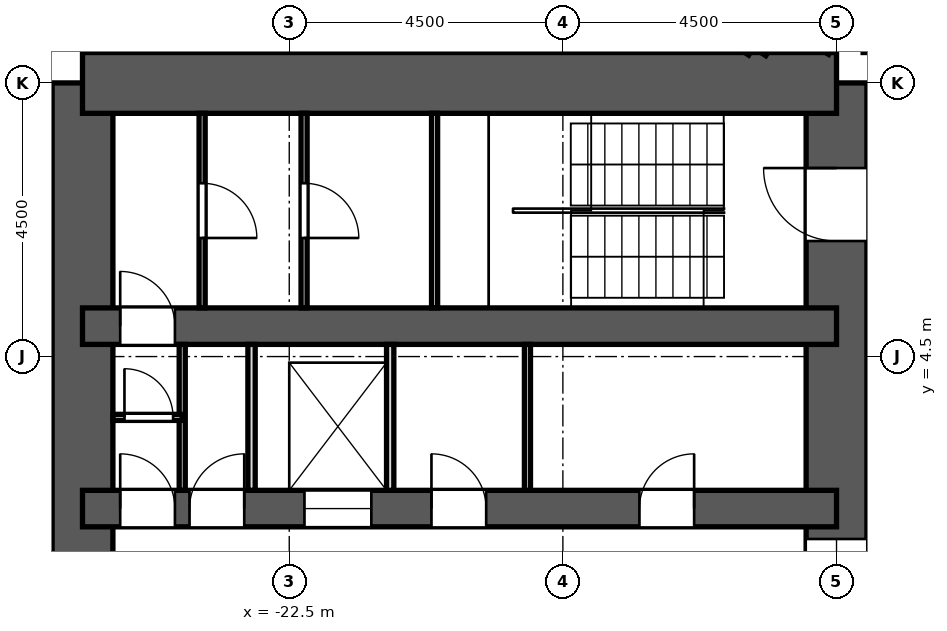
"""IFC4 building model, lengths in metres.
Left out: names, types, materials, properties, quantities, classifications, styles, units other than length and angle.
Written with IfcOpenShell. Run it as: python <this file> out.ifc"""

import sys

from ifc_helpers import new_model, si_unit, direction, frame, frame_2d, origin, place, context, subcontext, project, spatial, rectangle, extrude, element, fill, save


model = new_model("IFC4")
c1 = context("Model", 3, precision=1e-05, world=origin(), true_north=direction((0.0, 1.0)))
c2 = subcontext(c1, "Body", "Model", "MODEL_VIEW")
j1 = project(units=[si_unit("LENGTHUNIT", "METRE"), si_unit("PLANEANGLEUNIT", "RADIAN")], contexts=[c1])
p1 = place(None, origin())
s1 = spatial("IfcSite", under=j1, at=p1, CompositionType="ELEMENT")
p2 = place(p1, origin())
s2 = spatial("IfcBuilding", under=s1, at=p2, CompositionType="ELEMENT")
p3 = place(p2, frame((0.0, 0.0, 26.3)))
s3 = spatial("IfcBuildingStorey", under=s2, at=p3, CompositionType="ELEMENT", Elevation=26.3)
p4 = place(p3, frame((-13.5, -9.0, 0.0), z_axis=(0.0, 0.0, 1.0), x_axis=(0.0, 1.0, 0.0)))
e1 = element("IfcWall", 1, at=p4, inside=s3, PredefinedType="SHEAR", context=c2, shape_type="SweptSolid", body=[
    extrude(rectangle(XDim=18.0, YDim=1.0, at=frame_2d((9.0, 0.0))), origin(), (0.0, 0.0, 1.0), 3.3),
])
p5 = place(p4, frame((15.4, 0.0, 0.0)))
e2 = element("IfcOpeningElement", 2, at=p5, cuts=e1, PredefinedType="OPENING", context=c2, shape_type="SweptSolid", body=[
    extrude(rectangle(XDim=1.2, YDim=2.1, at=frame_2d((0.6, 1.05))), frame((0.0, 0.512, 0.0), z_axis=(0.0, -1.0, 0.0), x_axis=(1.0, 0.0, 0.0)), (0.0, 0.0, 1.0), 1.024),
])
p6 = place(p4, frame((1.4, 0.0, 0.0)))
e3 = element("IfcOpeningElement", 3, at=p6, cuts=e1, PredefinedType="OPENING", context=c2, shape_type="SweptSolid", body=[
    extrude(rectangle(XDim=1.2, YDim=2.1, at=frame_2d((0.6, 1.05))), frame((0.0, 0.512, 0.0), z_axis=(0.0, -1.0, 0.0), x_axis=(1.0, 0.0, 0.0)), (0.0, 0.0, 1.0), 1.024),
])
p7 = place(p4, frame((7.5, 0.0, 0.0)))
e4 = element("IfcOpeningElement", 4, at=p7, cuts=e1, PredefinedType="OPENING", context=c2, shape_type="SweptSolid", body=[
    extrude(rectangle(XDim=3.0, YDim=2.4, at=frame_2d((1.5, 1.2))), frame((0.0, 0.512, 0.0), z_axis=(0.0, -1.0, 0.0), x_axis=(1.0, 0.0, 0.0)), (0.0, 0.0, 1.0), 1.024),
])
p8 = place(p3, frame((-25.9, -9.0, 0.0), z_axis=(0.0, 0.0, 1.0), x_axis=(0.0, 1.0, 0.0)))
e5 = element("IfcWall", 5, at=p8, inside=s3, PredefinedType="SHEAR", context=c2, shape_type="SweptSolid", body=[
    extrude(rectangle(XDim=18.0, YDim=1.0, at=frame_2d((9.0, 0.0))), origin(), (0.0, 0.0, 1.0), 3.3),
])
p9 = place(p3, frame((-13.5, 9.0, 0.0), z_axis=(0.0, 0.0, 1.0), x_axis=(-1.0, 0.0, 0.0)))
e6 = element("IfcWall", 6, at=p9, inside=s3, PredefinedType="SHEAR", context=c2, shape_type="SweptSolid", body=[
    extrude(rectangle(XDim=12.4, YDim=1.0, at=frame_2d((6.2, 0.0))), origin(), (0.0, 0.0, 1.0), 3.3),
])
p10 = place(p3, frame((-13.5, 5.0, 0.0), z_axis=(0.0, 0.0, 1.0), x_axis=(-1.0, 0.0, 0.0)))
e7 = element("IfcWall", 7, at=p10, inside=s3, PredefinedType="SHEAR", context=c2, shape_type="SweptSolid", body=[
    extrude(rectangle(XDim=12.4, YDim=0.6, at=frame_2d((6.2, 0.0))), origin(), (0.0, 0.0, 1.0), 3.3),
])
p11 = place(p10, frame((10.88, 0.0, 0.0)))
e8 = element("IfcOpeningElement", 8, at=p11, cuts=e7, PredefinedType="OPENING", context=c2, shape_type="SweptSolid", body=[
    extrude(rectangle(XDim=0.9, YDim=2.1, at=frame_2d((0.45, 1.05))), frame((0.0, 0.312, 0.0), z_axis=(0.0, -1.0, 0.0), x_axis=(1.0, 0.0, 0.0)), (0.0, 0.0, 1.0), 0.624),
])
p12 = place(p3, frame((-13.5, 2.0, 0.0), z_axis=(0.0, 0.0, 1.0), x_axis=(-1.0, 0.0, 0.0)))
e9 = element("IfcWall", 9, at=p12, inside=s3, PredefinedType="SHEAR", context=c2, shape_type="SweptSolid", body=[
    extrude(rectangle(XDim=12.4, YDim=0.6, at=frame_2d((6.2, 0.0))), origin(), (0.0, 0.0, 1.0), 3.3),
])
p13 = place(p12, frame((7.65, 0.0, 0.0)))
e10 = element("IfcOpeningElement", 10, at=p13, cuts=e9, PredefinedType="OPENING", context=c2, shape_type="SweptSolid", body=[
    extrude(rectangle(XDim=1.1, YDim=2.1, at=frame_2d((0.55, 1.05))), frame((0.0, 0.312, 0.0), z_axis=(0.0, -1.0, 0.0), x_axis=(1.0, 0.0, 0.0)), (0.0, 0.0, 1.0), 0.624),
])
p14 = place(p12, frame((2.341, 0.0, 0.0)))
e11 = element("IfcOpeningElement", 11, at=p14, cuts=e9, PredefinedType="OPENING", context=c2, shape_type="SweptSolid", body=[
    extrude(rectangle(XDim=0.9, YDim=2.1, at=frame_2d((0.45, 1.05))), frame((0.0, 0.312, 0.0), z_axis=(0.0, -1.0, 0.0), x_axis=(1.0, 0.0, 0.0)), (0.0, 0.0, 1.0), 0.624),
])
p15 = place(p12, frame((5.761, 0.0, 0.0)))
e12 = element("IfcOpeningElement", 12, at=p15, cuts=e9, PredefinedType="OPENING", context=c2, shape_type="SweptSolid", body=[
    extrude(rectangle(XDim=0.9, YDim=2.1, at=frame_2d((0.45, 1.05))), frame((0.0, 0.312, 0.0), z_axis=(0.0, -1.0, 0.0), x_axis=(1.0, 0.0, 0.0)), (0.0, 0.0, 1.0), 0.624),
])
p16 = place(p12, frame((9.74, 0.0, 0.0)))
e13 = element("IfcOpeningElement", 13, at=p16, cuts=e9, PredefinedType="OPENING", context=c2, shape_type="SweptSolid", body=[
    extrude(rectangle(XDim=0.9, YDim=2.1, at=frame_2d((0.45, 1.05))), frame((0.0, 0.312, 0.0), z_axis=(0.0, -1.0, 0.0), x_axis=(1.0, 0.0, 0.0)), (0.0, 0.0, 1.0), 0.624),
])
p17 = place(p12, frame((10.88, 0.0, 0.0)))
e14 = element("IfcOpeningElement", 14, at=p17, cuts=e9, PredefinedType="OPENING", context=c2, shape_type="SweptSolid", body=[
    extrude(rectangle(XDim=0.9, YDim=2.1, at=frame_2d((0.45, 1.05))), frame((0.0, 0.312, 0.0), z_axis=(0.0, -1.0, 0.0), x_axis=(1.0, 0.0, 0.0)), (0.0, 0.0, 1.0), 0.624),
])
p18 = place(p3, frame((-26.208, 11.585, 0.0), z_axis=(0.0, 0.0, 1.0), x_axis=(-0.342028474173, -0.939689588564, 0.0)))
e15 = element("IfcWall", 15, at=p18, inside=s3, PredefinedType="SOLIDWALL", context=c2, shape_type="SweptSolid", body=[
    extrude(rectangle(XDim=3.846, YDim=0.6, at=frame_2d((1.923, 0.0))), origin(), (0.0, 0.0, 1.0), 2.75),
])
p19 = place(p3, frame((-15.957, 10.362, 0.0), z_axis=(0.0, 0.0, 1.0), x_axis=(0.838795721465, -0.544446267002, 0.0)))
e16 = element("IfcWall", 16, at=p19, inside=s3, PredefinedType="PARTITIONING", context=c2, shape_type="SweptSolid", body=[
    extrude(rectangle(XDim=1.583, YDim=0.125, at=frame_2d((0.792, 0.0))), origin(), (0.0, 0.0, 1.0), 2.75),
])
p20 = place(p3, frame((-19.325, 12.307, 0.0), z_axis=(0.0, 0.0, 1.0), x_axis=(0.843449781198, -0.537208029163, 0.0)))
e17 = element("IfcWall", 17, at=p20, inside=s3, PredefinedType="PARTITIONING", context=c2, shape_type="SweptSolid", body=[
    extrude(rectangle(XDim=5.225, YDim=0.1, at=frame_2d((2.612, 0.0))), origin(), (0.0, 0.0, 1.0), 2.75),
])
p21 = place(p20, frame((2.163, 0.0, 0.0)))
e18 = element("IfcOpeningElement", 18, at=p21, cuts=e17, PredefinedType="OPENING", context=c2, shape_type="SweptSolid", body=[
    extrude(rectangle(XDim=0.9, YDim=2.1, at=frame_2d((0.45, 1.05))), frame((0.0, 0.062, 0.0), z_axis=(0.0, -1.0, 0.0), x_axis=(1.0, 0.0, 0.0)), (0.0, 0.0, 1.0), 0.124),
])
p22 = place(p3, frame((-13.683, 9.5, 0.0), z_axis=(0.0, 0.0, 1.0), x_axis=(0.500018234033, 0.866014876105, 0.0)))
e19 = element("IfcWall", 19, at=p22, inside=s3, PredefinedType="PARTITIONING", context=c2, shape_type="SweptSolid", body=[
    extrude(rectangle(XDim=1.286, YDim=0.125, at=frame_2d((0.643, 0.0))), origin(), (0.0, 0.0, 1.0), 2.75),
])
p23 = place(p3, frame((-18.583, 2.3, 0.0), z_axis=(0.0, 0.0, 1.0), x_axis=(0.0, 1.0, 0.0)))
e20 = element("IfcWall", 20, at=p23, inside=s3, PredefinedType="PARTITIONING", context=c2, shape_type="SweptSolid", body=[
    extrude(rectangle(XDim=2.4, YDim=0.1, at=frame_2d((1.2, 0.0))), origin(), (0.0, 0.0, 1.0), 2.75),
])
for number, where, z_axis, x_axis in (
    (21, (-20.84, 2.3, 0.0), (0.0, 0.0, 1.0), (0.0, 1.0, 0.0)),
    (22, (-23.12, 2.3, 0.0), (0.0, 0.0, 1.0), (0.0, 1.0, 0.0)),
):
    element("IfcWall", number, at=place(p3, frame(where, z_axis=z_axis, x_axis=x_axis)), inside=s3, PredefinedType="PARTITIONING", context=c2, shape_type="SweptSolid", body=[
        extrude(rectangle(XDim=2.4, YDim=0.12, at=frame_2d((1.2, 0.0))), origin(), (0.0, 0.0, 1.0), 2.75),
    ])
p24 = place(p3, frame((-24.26, 2.3, 0.0), z_axis=(0.0, 0.0, 1.0), x_axis=(0.0, 1.0, 0.0)))
e23 = element("IfcWall", 23, at=p24, inside=s3, PredefinedType="PARTITIONING", context=c2, shape_type="SweptSolid", body=[
    extrude(rectangle(XDim=2.4, YDim=0.1, at=frame_2d((1.2, 0.0))), origin(), (0.0, 0.0, 1.0), 2.75),
])
p25 = place(p3, frame((-24.26, 3.5, 0.0), z_axis=(0.0, 0.0, 1.0), x_axis=(-1.0, 0.0, 0.0)))
e24 = element("IfcWall", 24, at=p25, inside=s3, PredefinedType="PARTITIONING", context=c2, shape_type="SweptSolid", body=[
    extrude(rectangle(XDim=1.14, YDim=0.1, at=frame_2d((0.57, 0.0))), origin(), (0.0, 0.0, 1.0), 2.75),
])
p26 = place(p25, frame((0.15, 0.0, 0.0)))
e25 = element("IfcOpeningElement", 25, at=p26, cuts=e24, PredefinedType="OPENING", context=c2, shape_type="SweptSolid", body=[
    extrude(rectangle(XDim=0.8, YDim=2.1, at=frame_2d((0.4, 1.05))), frame((0.0, 0.062, 0.0), z_axis=(0.0, -1.0, 0.0), x_axis=(1.0, 0.0, 0.0)), (0.0, 0.0, 1.0), 0.124),
])
p27 = place(p3, frame((-20.11, 5.3, 0.0), z_axis=(0.0, 0.0, 1.0), x_axis=(0.0, 1.0, 0.0)))
e26 = element("IfcWall", 26, at=p27, inside=s3, PredefinedType="PARTITIONING", context=c2, shape_type="SweptSolid", body=[
    extrude(rectangle(XDim=3.2, YDim=0.1, at=frame_2d((1.6, 0.0))), origin(), (0.0, 0.0, 1.0), 2.75),
])
p28 = place(p3, frame((-22.256, 5.3, 0.0), z_axis=(0.0, 0.0, 1.0), x_axis=(0.0, 1.0, 0.0)))
e27 = element("IfcWall", 27, at=p28, inside=s3, PredefinedType="PARTITIONING", context=c2, shape_type="SweptSolid", body=[
    extrude(rectangle(XDim=3.2, YDim=0.1, at=frame_2d((1.6, 0.0))), origin(), (0.0, 0.0, 1.0), 2.75),
])
p29 = place(p28, frame((1.15, 0.0, 0.0)))
e28 = element("IfcOpeningElement", 28, at=p29, cuts=e27, PredefinedType="OPENING", context=c2, shape_type="SweptSolid", body=[
    extrude(rectangle(XDim=0.9, YDim=2.1, at=frame_2d((0.45, 1.05))), frame((0.0, 0.062, 0.0), z_axis=(0.0, -1.0, 0.0), x_axis=(1.0, 0.0, 0.0)), (0.0, 0.0, 1.0), 0.124),
])
p30 = place(p3, frame((-23.933, 5.3, 0.0), z_axis=(0.0, 0.0, 1.0), x_axis=(0.0, 1.0, 0.0)))
e29 = element("IfcWall", 29, at=p30, inside=s3, PredefinedType="PARTITIONING", context=c2, shape_type="SweptSolid", body=[
    extrude(rectangle(XDim=3.2, YDim=0.1, at=frame_2d((1.6, 0.0))), origin(), (0.0, 0.0, 1.0), 2.75),
])
p31 = place(p30, frame((1.15, 0.0, 0.0)))
e30 = element("IfcOpeningElement", 30, at=p31, cuts=e29, PredefinedType="OPENING", context=c2, shape_type="SweptSolid", body=[
    extrude(rectangle(XDim=0.9, YDim=2.1, at=frame_2d((0.45, 1.05))), frame((0.0, 0.062, 0.0), z_axis=(0.0, -1.0, 0.0), x_axis=(1.0, 0.0, 0.0)), (0.0, 0.0, 1.0), 0.124),
])
p32 = place(p13, origin())
e31 = element("IfcDoor", 31, at=p32, inside=s3, OperationType="DOUBLE_DOOR_SLIDING", PredefinedType="DOOR", context=c2, shape_type="SweptSolid", body=[
    extrude(rectangle(XDim=1.1, YDim=2.1, at=frame_2d((0.55, 1.05))), frame((0.0, 0.025, 0.0), z_axis=(0.0, -1.0, 0.0), x_axis=(1.0, 0.0, 0.0)), (0.0, 0.0, 1.0), 0.05),
])
fill(e10, e31)
p33 = place(p14, frame((0.9, 0.0, 0.0), z_axis=(0.0, 0.0, 1.0), x_axis=(-1.0, 0.0, 0.0)))
e32 = element("IfcDoor", 32, at=p33, inside=s3, OperationType="SINGLE_SWING_RIGHT", PredefinedType="DOOR", context=c2, shape_type="SweptSolid", body=[
    extrude(rectangle(XDim=0.9, YDim=2.1, at=frame_2d((0.45, 1.05))), frame((0.0, 0.025, 0.0), z_axis=(0.0, -1.0, 0.0), x_axis=(1.0, 0.0, 0.0)), (0.0, 0.0, 1.0), 0.05),
])
fill(e11, e32)
p34 = place(p15, frame((0.9, 0.0, 0.0), z_axis=(0.0, 0.0, 1.0), x_axis=(-1.0, 0.0, 0.0)))
e33 = element("IfcDoor", 33, at=p34, inside=s3, OperationType="SINGLE_SWING_LEFT", PredefinedType="DOOR", context=c2, shape_type="SweptSolid", body=[
    extrude(rectangle(XDim=0.9, YDim=2.1, at=frame_2d((0.45, 1.05))), frame((0.0, 0.025, 0.0), z_axis=(0.0, -1.0, 0.0), x_axis=(1.0, 0.0, 0.0)), (0.0, 0.0, 1.0), 0.05),
])
fill(e12, e33)
p35 = place(p16, frame((0.9, 0.0, 0.0), z_axis=(0.0, 0.0, 1.0), x_axis=(-1.0, 0.0, 0.0)))
e34 = element("IfcDoor", 34, at=p35, inside=s3, OperationType="SINGLE_SWING_RIGHT", PredefinedType="DOOR", context=c2, shape_type="SweptSolid", body=[
    extrude(rectangle(XDim=0.9, YDim=2.1, at=frame_2d((0.45, 1.05))), frame((0.0, 0.025, 0.0), z_axis=(0.0, -1.0, 0.0), x_axis=(1.0, 0.0, 0.0)), (0.0, 0.0, 1.0), 0.05),
])
fill(e13, e34)
p36 = place(p17, frame((0.9, 0.0, 0.0), z_axis=(0.0, 0.0, 1.0), x_axis=(-1.0, 0.0, 0.0)))
e35 = element("IfcDoor", 35, at=p36, inside=s3, OperationType="SINGLE_SWING_LEFT", PredefinedType="DOOR", context=c2, shape_type="SweptSolid", body=[
    extrude(rectangle(XDim=0.9, YDim=2.1, at=frame_2d((0.45, 1.05))), frame((0.0, 0.025, 0.0), z_axis=(0.0, -1.0, 0.0), x_axis=(1.0, 0.0, 0.0)), (0.0, 0.0, 1.0), 0.05),
])
fill(e14, e35)
p37 = place(p26, frame((0.8, 0.0, 0.0), z_axis=(0.0, 0.0, 1.0), x_axis=(-1.0, 0.0, 0.0)))
e36 = element("IfcDoor", 36, at=p37, inside=s3, OperationType="SINGLE_SWING_LEFT", PredefinedType="DOOR", context=c2, shape_type="SweptSolid", body=[
    extrude(rectangle(XDim=0.8, YDim=2.1, at=frame_2d((0.4, 1.05))), frame((0.0, 0.025, 0.0), z_axis=(0.0, -1.0, 0.0), x_axis=(1.0, 0.0, 0.0)), (0.0, 0.0, 1.0), 0.05),
])
fill(e25, e36)
p38 = place(p31, frame((0.9, 0.0, 0.0), z_axis=(0.0, 0.0, 1.0), x_axis=(-1.0, 0.0, 0.0)))
e37 = element("IfcDoor", 37, at=p38, inside=s3, OperationType="SINGLE_SWING_RIGHT", PredefinedType="DOOR", context=c2, shape_type="SweptSolid", body=[
    extrude(rectangle(XDim=0.9, YDim=2.1, at=frame_2d((0.45, 1.05))), frame((0.0, 0.025, 0.0), z_axis=(0.0, -1.0, 0.0), x_axis=(1.0, 0.0, 0.0)), (0.0, 0.0, 1.0), 0.05),
])
fill(e30, e37)
p39 = place(p29, frame((0.9, 0.0, 0.0), z_axis=(0.0, 0.0, 1.0), x_axis=(-1.0, 0.0, 0.0)))
e38 = element("IfcDoor", 38, at=p39, inside=s3, OperationType="SINGLE_SWING_RIGHT", PredefinedType="DOOR", context=c2, shape_type="SweptSolid", body=[
    extrude(rectangle(XDim=0.9, YDim=2.1, at=frame_2d((0.45, 1.05))), frame((0.0, 0.025, 0.0), z_axis=(0.0, -1.0, 0.0), x_axis=(1.0, 0.0, 0.0)), (0.0, 0.0, 1.0), 0.05),
])
fill(e28, e38)
p40 = place(p11, frame((0.9, 0.0, 0.0), z_axis=(0.0, 0.0, 1.0), x_axis=(-1.0, 0.0, 0.0)))
e39 = element("IfcDoor", 39, at=p40, inside=s3, OperationType="SINGLE_SWING_LEFT", PredefinedType="DOOR", context=c2, shape_type="SweptSolid", body=[
    extrude(rectangle(XDim=0.9, YDim=2.1, at=frame_2d((0.45, 1.05))), frame((0.0, 0.025, 0.0), z_axis=(0.0, -1.0, 0.0), x_axis=(1.0, 0.0, 0.0)), (0.0, 0.0, 1.0), 0.05),
])
fill(e8, e39)
p41 = place(p5, origin())
e40 = element("IfcDoor", 40, at=p41, inside=s3, OperationType="SINGLE_SWING_RIGHT", PredefinedType="DOOR", context=c2, shape_type="SweptSolid", body=[
    extrude(rectangle(XDim=1.2, YDim=2.1, at=frame_2d((0.6, 1.05))), frame((0.0, 0.025, 0.0), z_axis=(0.0, -1.0, 0.0), x_axis=(1.0, 0.0, 0.0)), (0.0, 0.0, 1.0), 0.05),
])
fill(e2, e40)
p42 = place(p7, origin())
e41 = element("IfcDoor", 41, at=p42, inside=s3, OperationType="DOUBLE_DOOR_SLIDING", PredefinedType="DOOR", context=c2, shape_type="SweptSolid", body=[
    extrude(rectangle(XDim=3.0, YDim=2.4, at=frame_2d((1.5, 1.2))), frame((0.0, 0.025, 0.0), z_axis=(0.0, -1.0, 0.0), x_axis=(1.0, 0.0, 0.0)), (0.0, 0.0, 1.0), 0.05),
])
fill(e4, e41)
save(model, sys.argv[1])
